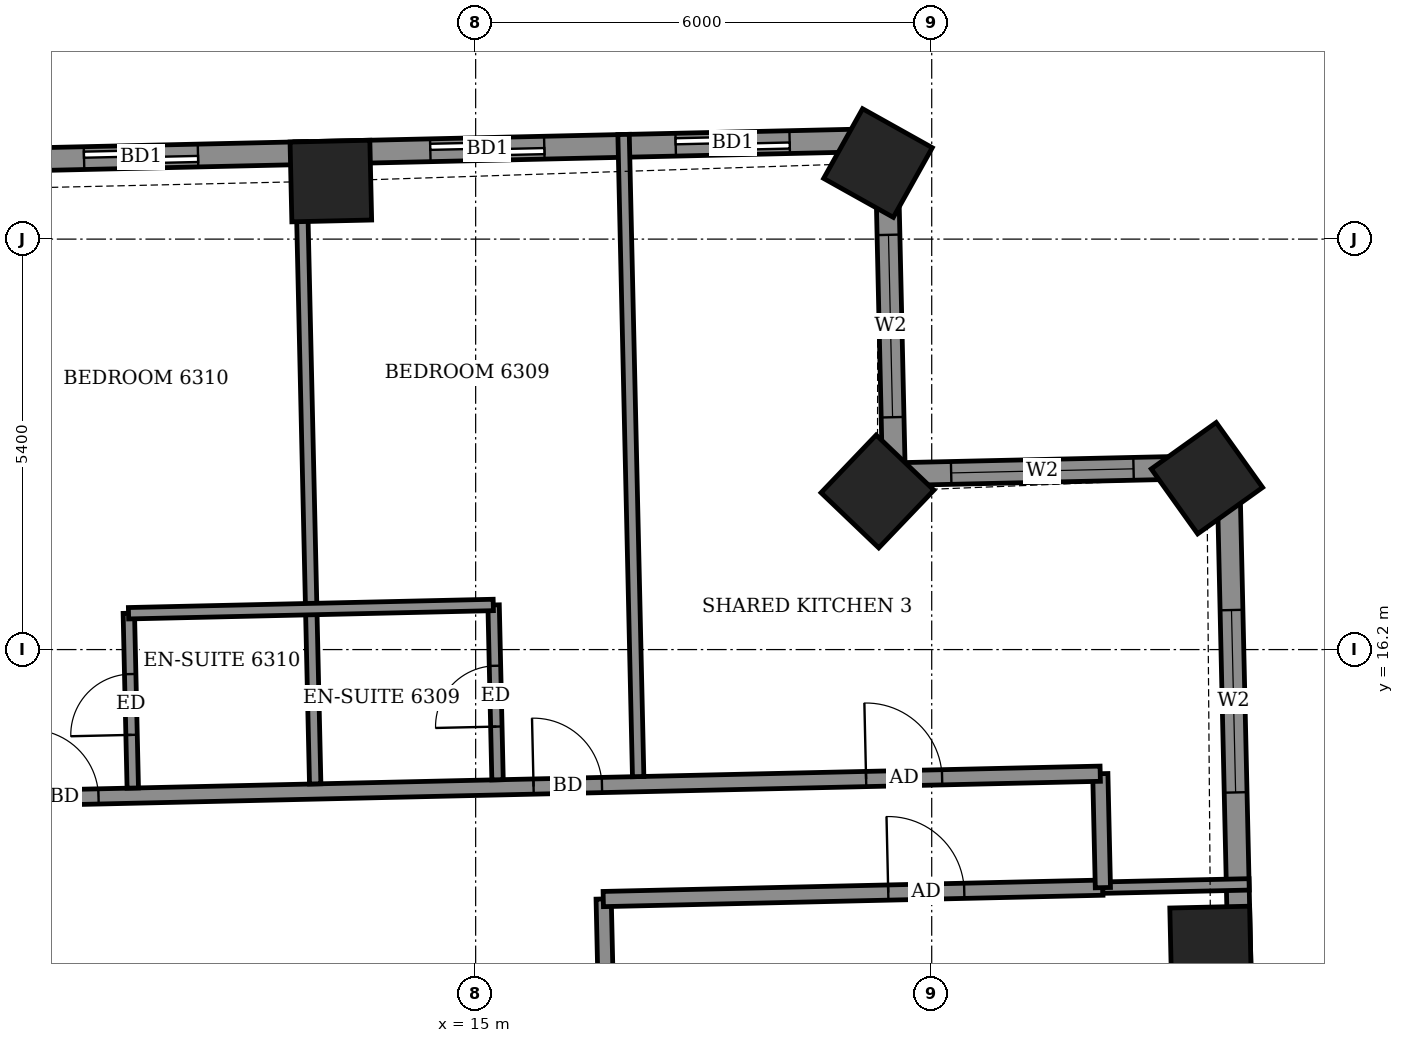
"""IFC4 building model, lengths in metres.
Left out: names, types, materials, properties, quantities, classifications, styles, units other than length and angle.
Written with IfcOpenShell. Run it as: python <this file> out.ifc"""

import sys

from ifc_helpers import new_model, si_unit, direction, frame, frame_2d, origin, origin_2d, place, context, subcontext, project, spatial, rectangle, extrude, element, fill, save


model = new_model("IFC4")
c1 = context("Model", 3, precision=1e-05, world=origin(), true_north=direction((0.0, 1.0)))
c2 = subcontext(c1, "Body", "Model", "MODEL_VIEW")
j1 = project(units=[si_unit("LENGTHUNIT", "METRE"), si_unit("PLANEANGLEUNIT", "RADIAN")], contexts=[c1])
p1 = place(None, origin())
s1 = spatial("IfcSite", under=j1, at=p1, CompositionType="ELEMENT")
p2 = place(p1, origin())
s2 = spatial("IfcBuilding", under=s1, at=p2, CompositionType="ELEMENT")
p3 = place(p2, frame((0.0, 0.0, 249.1)))
s3 = spatial("IfcBuildingStorey", under=s2, at=p3, CompositionType="ELEMENT", Elevation=249.1)
for number, where, z_axis, x_axis in (
    (1, (24.669, 12.287, -0.55), (0.0, 0.0, 1.0), (-0.023, 1.0, 0.0)),
    (2, (24.621, 18.455, -0.55), (0.0, 0.0, 1.0), (-0.581, 0.814, 0.0)),
    (3, (20.286, 18.281, -0.55), (0.0, 0.0, 1.0), (-0.723, 0.691, 0.0)),
    (4, (20.293, 22.601, -0.55), (0.0, 0.0, 1.0), (-0.873, 0.488, 0.0)),
    (5, (13.095, 22.364, -0.55), (0.0, 0.0, 1.0), (-1.0, -0.023, 0.0)),
):
    element("IfcColumn", number, at=place(p3, frame(where, z_axis=z_axis, x_axis=x_axis)), inside=s3, PredefinedType="COLUMN", context=c2, shape_type="SweptSolid", body=[
        extrude(rectangle(XDim=1.05, YDim=1.05, at=origin_2d()), origin(), (0.0, 0.0, 1.0), 3.6),
    ])
p4 = place(p3, frame((25.203, 5.31, 0.0), z_axis=(0.0, 0.0, 1.0), x_axis=(-0.022708061432, 0.999742138727, 0.0)))
e6 = element("IfcWall", 6, at=p4, inside=s3, PredefinedType="SOLIDWALL", context=c2, shape_type="SweptSolid", body=[
    extrude(rectangle(XDim=13.299, YDim=0.3, at=frame_2d((6.65, 0.0))), origin(), (0.0, 0.0, 1.0), 2.55),
])
p5 = place(p4, frame((3.986, 0.0, 0.0)))
e7 = element("IfcOpeningElement", 7, at=p5, cuts=e6, PredefinedType="OPENING", context=c2, shape_type="SweptSolid", body=[
    extrude(rectangle(XDim=1.5, YDim=2.4, at=frame_2d((0.75, 1.2))), frame((0.0, 0.16, 0.0), z_axis=(0.0, -1.0, 0.0), x_axis=(1.0, 0.0, 0.0)), (0.0, 0.0, 1.0), 0.32),
])
p6 = place(p4, frame((9.013, 0.0, 0.9)))
e8 = element("IfcOpeningElement", 8, at=p6, cuts=e6, PredefinedType="OPENING", context=c2, shape_type="SweptSolid", body=[
    extrude(rectangle(XDim=2.4, YDim=1.5, at=frame_2d((1.2, 0.75))), frame((0.0, 0.16, 0.0), z_axis=(0.0, -1.0, 0.0), x_axis=(1.0, 0.0, 0.0)), (0.0, 0.0, 1.0), 0.32),
])
p7 = place(p3, frame((24.901, 18.606, 0.0), z_axis=(0.0, 0.0, 1.0), x_axis=(-0.999747476176, -0.022471846368, 0.0)))
e9 = element("IfcWall", 9, at=p7, inside=s3, PredefinedType="SOLIDWALL", context=c2, shape_type="SweptSolid", body=[
    extrude(rectangle(XDim=4.4, YDim=0.3, at=frame_2d((2.2, 0.0))), origin(), (0.0, 0.0, 1.0), 2.55),
])
p8 = place(p7, frame((1.246, 0.0, 0.9)))
e10 = element("IfcOpeningElement", 10, at=p8, cuts=e9, PredefinedType="OPENING", context=c2, shape_type="SweptSolid", body=[
    extrude(rectangle(XDim=2.4, YDim=1.5, at=frame_2d((1.2, 0.75))), frame((0.0, 0.16, 0.0), z_axis=(0.0, -1.0, 0.0), x_axis=(1.0, 0.0, 0.0)), (0.0, 0.0, 1.0), 0.32),
])
p9 = place(p3, frame((20.502, 18.507, 0.0), z_axis=(0.0, 0.0, 1.0), x_axis=(-0.02247683371, 0.999747364061, 0.0)))
e11 = element("IfcWall", 11, at=p9, inside=s3, PredefinedType="SOLIDWALL", context=c2, shape_type="SweptSolid", body=[
    extrude(rectangle(XDim=4.399, YDim=0.3, at=frame_2d((2.2, 0.0))), origin(), (0.0, 0.0, 1.0), 2.55),
])
p10 = place(p9, frame((0.75, 0.0, 0.9)))
e12 = element("IfcOpeningElement", 12, at=p10, cuts=e11, PredefinedType="OPENING", context=c2, shape_type="SweptSolid", body=[
    extrude(rectangle(XDim=2.4, YDim=1.5, at=frame_2d((1.2, 0.75))), frame((0.0, 0.16, 0.0), z_axis=(0.0, -1.0, 0.0), x_axis=(1.0, 0.0, 0.0)), (0.0, 0.0, 1.0), 0.32),
])
p11 = place(p3, frame((20.403, 22.905, 0.0), z_axis=(0.0, 0.0, 1.0), x_axis=(-0.99974298964, -0.022670568288, 0.0)))
e13 = element("IfcWall", 13, at=p11, inside=s3, PredefinedType="SOLIDWALL", context=c2, shape_type="SweptSolid", body=[
    extrude(rectangle(XDim=44.509, YDim=0.3, at=frame_2d((22.254, 0.0))), origin(), (0.0, 0.0, 1.0), 2.5),
])
p12 = place(p11, frame((1.272, 0.0, 0.0)))
e14 = element("IfcOpeningElement", 14, at=p12, cuts=e13, PredefinedType="OPENING", context=c2, shape_type="SweptSolid", body=[
    extrude(rectangle(XDim=1.5, YDim=2.4, at=frame_2d((0.75, 1.2))), frame((0.0, 0.16, 0.0), z_axis=(0.0, -1.0, 0.0), x_axis=(1.0, 0.0, 0.0)), (0.0, 0.0, 1.0), 0.32),
])
p13 = place(p11, frame((4.501, 0.0, 0.0)))
e15 = element("IfcOpeningElement", 15, at=p13, cuts=e13, PredefinedType="OPENING", context=c2, shape_type="SweptSolid", body=[
    extrude(rectangle(XDim=1.5, YDim=2.4, at=frame_2d((0.75, 1.2))), frame((0.0, 0.16, 0.0), z_axis=(0.0, -1.0, 0.0), x_axis=(1.0, 0.0, 0.0)), (0.0, 0.0, 1.0), 0.32),
])
p14 = place(p11, frame((9.058, 0.0, 0.0)))
e16 = element("IfcOpeningElement", 16, at=p14, cuts=e13, PredefinedType="OPENING", context=c2, shape_type="SweptSolid", body=[
    extrude(rectangle(XDim=1.5, YDim=2.4, at=frame_2d((0.75, 1.2))), frame((0.0, 0.16, 0.0), z_axis=(0.0, -1.0, 0.0), x_axis=(1.0, 0.0, 0.0)), (0.0, 0.0, 1.0), 0.32),
])
p15 = place(p11, frame((12.46, 0.0, 0.0)))
e17 = element("IfcOpeningElement", 17, at=p15, cuts=e13, PredefinedType="OPENING", context=c2, shape_type="SweptSolid", body=[
    extrude(rectangle(XDim=1.5, YDim=2.4, at=frame_2d((0.75, 1.2))), frame((0.0, 0.16, 0.0), z_axis=(0.0, -1.0, 0.0), x_axis=(1.0, 0.0, 0.0)), (0.0, 0.0, 1.0), 0.32),
])
p16 = place(p11, frame((17.533, 0.0, 0.0)))
e18 = element("IfcOpeningElement", 18, at=p16, cuts=e13, PredefinedType="OPENING", context=c2, shape_type="SweptSolid", body=[
    extrude(rectangle(XDim=1.5, YDim=2.4, at=frame_2d((0.75, 1.2))), frame((0.0, 0.16, 0.0), z_axis=(0.0, -1.0, 0.0), x_axis=(1.0, 0.0, 0.0)), (0.0, 0.0, 1.0), 0.32),
])
p17 = place(p11, frame((22.993, 0.0, 0.0)))
e19 = element("IfcOpeningElement", 19, at=p17, cuts=e13, PredefinedType="OPENING", context=c2, shape_type="SweptSolid", body=[
    extrude(rectangle(XDim=1.2, YDim=2.4, at=frame_2d((0.6, 1.2))), frame((0.0, 0.16, 0.0), z_axis=(0.0, -1.0, 0.0), x_axis=(1.0, 0.0, 0.0)), (0.0, 0.0, 1.0), 0.32),
])
p18 = place(p11, frame((26.033, 0.0, 0.0)))
e20 = element("IfcOpeningElement", 20, at=p18, cuts=e13, PredefinedType="OPENING", context=c2, shape_type="SweptSolid", body=[
    extrude(rectangle(XDim=1.5, YDim=2.4, at=frame_2d((0.75, 1.2))), frame((0.0, 0.16, 0.0), z_axis=(0.0, -1.0, 0.0), x_axis=(1.0, 0.0, 0.0)), (0.0, 0.0, 1.0), 0.32),
])
p19 = place(p11, frame((30.827, 0.0, 0.0)))
e21 = element("IfcOpeningElement", 21, at=p19, cuts=e13, PredefinedType="OPENING", context=c2, shape_type="SweptSolid", body=[
    extrude(rectangle(XDim=1.5, YDim=2.4, at=frame_2d((0.75, 1.2))), frame((0.0, 0.16, 0.0), z_axis=(0.0, -1.0, 0.0), x_axis=(1.0, 0.0, 0.0)), (0.0, 0.0, 1.0), 0.32),
])
p20 = place(p11, frame((34.286, 0.0, 0.0)))
e22 = element("IfcOpeningElement", 22, at=p20, cuts=e13, PredefinedType="OPENING", context=c2, shape_type="SweptSolid", body=[
    extrude(rectangle(XDim=1.5, YDim=2.4, at=frame_2d((0.75, 1.2))), frame((0.0, 0.16, 0.0), z_axis=(0.0, -1.0, 0.0), x_axis=(1.0, 0.0, 0.0)), (0.0, 0.0, 1.0), 0.32),
])
p21 = place(p11, frame((38.811, 0.0, 0.0)))
e23 = element("IfcOpeningElement", 23, at=p21, cuts=e13, PredefinedType="OPENING", context=c2, shape_type="SweptSolid", body=[
    extrude(rectangle(XDim=1.5, YDim=2.4, at=frame_2d((0.75, 1.2))), frame((0.0, 0.16, 0.0), z_axis=(0.0, -1.0, 0.0), x_axis=(1.0, 0.0, 0.0)), (0.0, 0.0, 1.0), 0.32),
])
p22 = place(p11, frame((42.148, 0.0, 0.9)))
e24 = element("IfcOpeningElement", 24, at=p22, cuts=e13, PredefinedType="OPENING", context=c2, shape_type="SweptSolid", body=[
    extrude(rectangle(XDim=1.2, YDim=1.5, at=frame_2d((0.6, 0.75))), frame((0.0, 0.16, 0.0), z_axis=(0.0, -1.0, 0.0), x_axis=(1.0, 0.0, 0.0)), (0.0, 0.0, 1.0), 0.32),
])
p23 = place(p3, frame((16.803, 7.675, 0.0), z_axis=(0.0, 0.0, 1.0), x_axis=(-0.022667483124, 0.999743059595, 0.0)))
e25 = element("IfcWall", 25, at=p23, inside=s3, PredefinedType="PARTITIONING", context=c2, shape_type="SweptSolid", body=[
    extrude(rectangle(XDim=5.245, YDim=0.2, at=frame_2d((2.623, 0.0))), origin(), (0.0, 0.0, 1.0), 3.05),
])
p24 = place(p3, frame((16.679, 12.918, 0.0), z_axis=(0.0, 0.0, 1.0), x_axis=(0.999739125025, 0.022840356696, 0.0)))
e26 = element("IfcWall", 26, at=p24, inside=s3, PredefinedType="PARTITIONING", context=c2, shape_type="SweptSolid", body=[
    extrude(rectangle(XDim=6.574, YDim=0.2, at=frame_2d((3.287, 0.0))), origin(), (0.0, 0.0, 1.0), 3.05),
])
p25 = place(p24, frame((3.75, 0.0, 0.0)))
e27 = element("IfcOpeningElement", 27, at=p25, cuts=e26, PredefinedType="OPENING", context=c2, shape_type="SweptSolid", body=[
    extrude(rectangle(XDim=1.0, YDim=2.1, at=frame_2d((0.5, 1.05))), frame((0.0, 0.11, 0.0), z_axis=(0.0, -1.0, 0.0), x_axis=(1.0, 0.0, 0.0)), (0.0, 0.0, 1.0), 0.22),
])
p26 = place(p3, frame((23.251, 13.068, 0.0), z_axis=(0.0, 0.0, 1.0), x_axis=(0.999750982596, 0.022315304114, 0.0)))
e28 = element("IfcWall", 28, at=p26, inside=s3, PredefinedType="PARTITIONING", context=c2, shape_type="SweptSolid", body=[
    extrude(rectangle(XDim=1.926, YDim=0.15, at=frame_2d((0.963, 0.0))), origin(), (0.0, 0.0, 1.0), 2.55),
])
p27 = place(p3, frame((23.252, 13.068, 0.0), z_axis=(0.0, 0.0, 1.0), x_axis=(-0.022636322434, 0.999743765625, 0.0)))
e29 = element("IfcWall", 29, at=p27, inside=s3, PredefinedType="PARTITIONING", context=c2, shape_type="SweptSolid", body=[
    extrude(rectangle(XDim=1.499, YDim=0.2, at=frame_2d((0.75, 0.0))), origin(), (0.0, 0.0, 1.0), 3.05),
])
p28 = place(p3, frame((-27.652, 13.413, 0.0), z_axis=(0.0, 0.0, 1.0), x_axis=(0.999742864992, 0.022676064408, 0.0)))
e30 = element("IfcWall", 30, at=p28, inside=s3, PredefinedType="PARTITIONING", context=c2, shape_type="SweptSolid", body=[
    extrude(rectangle(XDim=50.882, YDim=0.2, at=frame_2d((25.441, 0.0))), origin(), (0.0, 0.0, 1.0), 3.05),
])
p29 = place(p28, frame((47.801, 0.0, 0.0)))
e31 = element("IfcOpeningElement", 31, at=p29, cuts=e30, PredefinedType="OPENING", context=c2, shape_type="SweptSolid", body=[
    extrude(rectangle(XDim=1.0, YDim=2.1, at=frame_2d((0.5, 1.05))), frame((0.0, 0.11, 0.0), z_axis=(0.0, -1.0, 0.0), x_axis=(1.0, 0.0, 0.0)), (0.0, 0.0, 1.0), 0.22),
])
p30 = place(p28, frame((43.425, 0.0, 0.0)))
e32 = element("IfcOpeningElement", 32, at=p30, cuts=e30, PredefinedType="OPENING", context=c2, shape_type="SweptSolid", body=[
    extrude(rectangle(XDim=0.9, YDim=2.1, at=frame_2d((0.45, 1.05))), frame((0.0, 0.11, 0.0), z_axis=(0.0, -1.0, 0.0), x_axis=(1.0, 0.0, 0.0)), (0.0, 0.0, 1.0), 0.22),
])
p31 = place(p28, frame((36.8, 0.0, 0.0)))
e33 = element("IfcOpeningElement", 33, at=p31, cuts=e30, PredefinedType="OPENING", context=c2, shape_type="SweptSolid", body=[
    extrude(rectangle(XDim=0.9, YDim=2.1, at=frame_2d((0.45, 1.05))), frame((0.0, 0.11, 0.0), z_axis=(0.0, -1.0, 0.0), x_axis=(1.0, 0.0, 0.0)), (0.0, 0.0, 1.0), 0.22),
])
p32 = place(p28, frame((34.975, 0.0, 0.0)))
e34 = element("IfcOpeningElement", 34, at=p32, cuts=e30, PredefinedType="OPENING", context=c2, shape_type="SweptSolid", body=[
    extrude(rectangle(XDim=0.9, YDim=2.1, at=frame_2d((0.45, 1.05))), frame((0.0, 0.11, 0.0), z_axis=(0.0, -1.0, 0.0), x_axis=(1.0, 0.0, 0.0)), (0.0, 0.0, 1.0), 0.22),
])
p33 = place(p28, frame((28.325, 0.0, 0.0)))
e35 = element("IfcOpeningElement", 35, at=p33, cuts=e30, PredefinedType="OPENING", context=c2, shape_type="SweptSolid", body=[
    extrude(rectangle(XDim=0.9, YDim=2.1, at=frame_2d((0.45, 1.05))), frame((0.0, 0.11, 0.0), z_axis=(0.0, -1.0, 0.0), x_axis=(1.0, 0.0, 0.0)), (0.0, 0.0, 1.0), 0.22),
])
p34 = place(p28, frame((26.475, 0.0, 0.0)))
e36 = element("IfcOpeningElement", 36, at=p34, cuts=e30, PredefinedType="OPENING", context=c2, shape_type="SweptSolid", body=[
    extrude(rectangle(XDim=0.9, YDim=2.1, at=frame_2d((0.45, 1.05))), frame((0.0, 0.11, 0.0), z_axis=(0.0, -1.0, 0.0), x_axis=(1.0, 0.0, 0.0)), (0.0, 0.0, 1.0), 0.22),
])
p35 = place(p28, frame((19.825, 0.0, 0.0)))
e37 = element("IfcOpeningElement", 37, at=p35, cuts=e30, PredefinedType="OPENING", context=c2, shape_type="SweptSolid", body=[
    extrude(rectangle(XDim=0.9, YDim=2.1, at=frame_2d((0.45, 1.05))), frame((0.0, 0.11, 0.0), z_axis=(0.0, -1.0, 0.0), x_axis=(1.0, 0.0, 0.0)), (0.0, 0.0, 1.0), 0.22),
])
p36 = place(p28, frame((17.975, 0.0, 0.0)))
e38 = element("IfcOpeningElement", 38, at=p36, cuts=e30, PredefinedType="OPENING", context=c2, shape_type="SweptSolid", body=[
    extrude(rectangle(XDim=0.9, YDim=2.1, at=frame_2d((0.45, 1.05))), frame((0.0, 0.11, 0.0), z_axis=(0.0, -1.0, 0.0), x_axis=(1.0, 0.0, 0.0)), (0.0, 0.0, 1.0), 0.22),
])
p37 = place(p28, frame((11.325, 0.0, 0.0)))
e39 = element("IfcOpeningElement", 39, at=p37, cuts=e30, PredefinedType="OPENING", context=c2, shape_type="SweptSolid", body=[
    extrude(rectangle(XDim=0.9, YDim=2.1, at=frame_2d((0.45, 1.05))), frame((0.0, 0.11, 0.0), z_axis=(0.0, -1.0, 0.0), x_axis=(1.0, 0.0, 0.0)), (0.0, 0.0, 1.0), 0.22),
])
p38 = place(p28, frame((9.475, 0.0, 0.0)))
e40 = element("IfcOpeningElement", 40, at=p38, cuts=e30, PredefinedType="OPENING", context=c2, shape_type="SweptSolid", body=[
    extrude(rectangle(XDim=0.9, YDim=2.1, at=frame_2d((0.45, 1.05))), frame((0.0, 0.11, 0.0), z_axis=(0.0, -1.0, 0.0), x_axis=(1.0, 0.0, 0.0)), (0.0, 0.0, 1.0), 0.22),
])
p39 = place(p28, frame((2.772, 0.0, 0.0)))
e41 = element("IfcOpeningElement", 41, at=p39, cuts=e30, PredefinedType="OPENING", context=c2, shape_type="SweptSolid", body=[
    extrude(rectangle(XDim=1.0, YDim=2.1, at=frame_2d((0.5, 1.05))), frame((0.0, 0.11, 0.0), z_axis=(0.0, -1.0, 0.0), x_axis=(1.0, 0.0, 0.0)), (0.0, 0.0, 1.0), 0.22),
])
p40 = place(p3, frame((10.489, 14.378, 0.0), z_axis=(0.0, 0.0, 1.0), x_axis=(-0.022603288534, 0.999744513037, 0.0)))
e42 = element("IfcWall", 42, at=p40, inside=s3, PredefinedType="PARTITIONING", context=c2, shape_type="SweptSolid", body=[
    extrude(rectangle(XDim=2.301, YDim=0.15, at=frame_2d((1.15, 0.0))), origin(), (0.0, 0.0, 1.0), 3.05),
])
p41 = place(p40, frame((0.7, 0.0, 0.0)))
e43 = element("IfcOpeningElement", 43, at=p41, cuts=e42, PredefinedType="OPENING", context=c2, shape_type="SweptSolid", body=[
    extrude(rectangle(XDim=0.8, YDim=2.1, at=frame_2d((0.4, 1.05))), frame((0.0, 0.085, 0.0), z_axis=(0.0, -1.0, 0.0), x_axis=(1.0, 0.0, 0.0)), (0.0, 0.0, 1.0), 0.17),
])
p42 = place(p3, frame((12.889, 14.433, 0.0), z_axis=(0.0, 0.0, 1.0), x_axis=(-0.022708935798, 0.999742118866, 0.0)))
e44 = element("IfcWall", 44, at=p42, inside=s3, PredefinedType="PARTITIONING", context=c2, shape_type="SweptSolid", body=[
    extrude(rectangle(XDim=8.45, YDim=0.15, at=frame_2d((4.225, 0.0))), origin(), (0.0, 0.0, 1.0), 3.05),
])
p43 = place(p3, frame((15.288, 14.487, 0.0), z_axis=(0.0, 0.0, 1.0), x_axis=(-0.022603288534, 0.999744513037, 0.0)))
e45 = element("IfcWall", 45, at=p43, inside=s3, PredefinedType="PARTITIONING", context=c2, shape_type="SweptSolid", body=[
    extrude(rectangle(XDim=2.301, YDim=0.15, at=frame_2d((1.15, 0.0))), origin(), (0.0, 0.0, 1.0), 3.05),
])
p44 = place(p43, frame((0.7, 0.0, 0.0)))
e46 = element("IfcOpeningElement", 46, at=p44, cuts=e45, PredefinedType="OPENING", context=c2, shape_type="SweptSolid", body=[
    extrude(rectangle(XDim=0.8, YDim=2.1, at=frame_2d((0.4, 1.05))), frame((0.0, 0.085, 0.0), z_axis=(0.0, -1.0, 0.0), x_axis=(1.0, 0.0, 0.0)), (0.0, 0.0, 1.0), 0.17),
])
p45 = place(p3, frame((17.138, 14.529, 0.0), z_axis=(0.0, 0.0, 1.0), x_axis=(-0.022708935798, 0.999742118866, 0.0)))
e47 = element("IfcWall", 47, at=p45, inside=s3, PredefinedType="PARTITIONING", context=c2, shape_type="SweptSolid", body=[
    extrude(rectangle(XDim=8.45, YDim=0.15, at=frame_2d((4.225, 0.0))), origin(), (0.0, 0.0, 1.0), 2.5),
])
p46 = place(p3, frame((10.433, 16.678, 0.0), z_axis=(0.0, 0.0, 1.0), x_axis=(0.999741520352, 0.022735269617, 0.0)))
e48 = element("IfcWall", 48, at=p46, inside=s3, PredefinedType="PARTITIONING", context=c2, shape_type="SweptSolid", body=[
    extrude(rectangle(XDim=4.8, YDim=0.15, at=frame_2d((2.4, 0.0))), origin(), (0.0, 0.0, 1.0), 3.05),
])
p47 = place(p6, origin())
e49 = element("IfcWindow", 49, at=p47, inside=s3, PartitioningType="DOUBLE_PANEL_VERTICAL", PredefinedType="WINDOW", context=c2, shape_type="SweptSolid", body=[
    extrude(rectangle(XDim=2.4, YDim=1.5, at=frame_2d((1.2, 0.75))), frame((0.0, 0.03, 0.0), z_axis=(0.0, -1.0, 0.0), x_axis=(1.0, 0.0, 0.0)), (0.0, 0.0, 1.0), 0.06),
])
fill(e8, e49)
p48 = place(p8, origin())
e50 = element("IfcWindow", 50, at=p48, inside=s3, PartitioningType="DOUBLE_PANEL_VERTICAL", PredefinedType="WINDOW", context=c2, shape_type="SweptSolid", body=[
    extrude(rectangle(XDim=2.4, YDim=1.5, at=frame_2d((1.2, 0.75))), frame((0.0, 0.03, 0.0), z_axis=(0.0, -1.0, 0.0), x_axis=(1.0, 0.0, 0.0)), (0.0, 0.0, 1.0), 0.06),
])
fill(e10, e50)
p49 = place(p10, origin())
e51 = element("IfcWindow", 51, at=p49, inside=s3, PartitioningType="DOUBLE_PANEL_VERTICAL", PredefinedType="WINDOW", context=c2, shape_type="SweptSolid", body=[
    extrude(rectangle(XDim=2.4, YDim=1.5, at=frame_2d((1.2, 0.75))), frame((0.0, 0.03, 0.0), z_axis=(0.0, -1.0, 0.0), x_axis=(1.0, 0.0, 0.0)), (0.0, 0.0, 1.0), 0.06),
])
fill(e12, e51)
p50 = place(p12, origin())
e52 = element("IfcDoor", 52, at=p50, inside=s3, OperationType="SLIDING_TO_LEFT", PredefinedType="DOOR", context=c2, shape_type="SweptSolid", body=[
    extrude(rectangle(XDim=1.5, YDim=2.4, at=frame_2d((0.75, 1.2))), frame((0.0, 0.025, 0.0), z_axis=(0.0, -1.0, 0.0), x_axis=(1.0, 0.0, 0.0)), (0.0, 0.0, 1.0), 0.05),
])
fill(e14, e52)
p51 = place(p13, origin())
e53 = element("IfcDoor", 53, at=p51, inside=s3, OperationType="SLIDING_TO_LEFT", PredefinedType="DOOR", context=c2, shape_type="SweptSolid", body=[
    extrude(rectangle(XDim=1.5, YDim=2.4, at=frame_2d((0.75, 1.2))), frame((0.0, 0.025, 0.0), z_axis=(0.0, -1.0, 0.0), x_axis=(1.0, 0.0, 0.0)), (0.0, 0.0, 1.0), 0.05),
])
fill(e15, e53)
p52 = place(p14, origin())
e54 = element("IfcDoor", 54, at=p52, inside=s3, OperationType="SLIDING_TO_LEFT", PredefinedType="DOOR", context=c2, shape_type="SweptSolid", body=[
    extrude(rectangle(XDim=1.5, YDim=2.4, at=frame_2d((0.75, 1.2))), frame((0.0, 0.025, 0.0), z_axis=(0.0, -1.0, 0.0), x_axis=(1.0, 0.0, 0.0)), (0.0, 0.0, 1.0), 0.05),
])
fill(e16, e54)
p53 = place(p25, origin())
e55 = element("IfcDoor", 55, at=p53, inside=s3, OperationType="SINGLE_SWING_RIGHT", PredefinedType="DOOR", context=c2, shape_type="SweptSolid", body=[
    extrude(rectangle(XDim=1.0, YDim=2.1, at=frame_2d((0.5, 1.05))), frame((0.0, 0.025, 0.0), z_axis=(0.0, -1.0, 0.0), x_axis=(1.0, 0.0, 0.0)), (0.0, 0.0, 1.0), 0.05),
])
fill(e27, e55)
p54 = place(p29, origin())
e56 = element("IfcDoor", 56, at=p54, inside=s3, OperationType="SINGLE_SWING_LEFT", PredefinedType="DOOR", context=c2, shape_type="SweptSolid", body=[
    extrude(rectangle(XDim=1.0, YDim=2.1, at=frame_2d((0.5, 1.05))), frame((0.0, 0.025, 0.0), z_axis=(0.0, -1.0, 0.0), x_axis=(1.0, 0.0, 0.0)), (0.0, 0.0, 1.0), 0.05),
])
fill(e31, e56)
p55 = place(p30, origin())
e57 = element("IfcDoor", 57, at=p55, inside=s3, OperationType="SINGLE_SWING_LEFT", PredefinedType="DOOR", context=c2, shape_type="SweptSolid", body=[
    extrude(rectangle(XDim=0.9, YDim=2.1, at=frame_2d((0.45, 1.05))), frame((0.0, 0.025, 0.0), z_axis=(0.0, -1.0, 0.0), x_axis=(1.0, 0.0, 0.0)), (0.0, 0.0, 1.0), 0.05),
])
fill(e32, e57)
p56 = place(p44, origin())
e58 = element("IfcDoor", 58, at=p56, inside=s3, OperationType="SINGLE_SWING_LEFT", PredefinedType="DOOR", context=c2, shape_type="SweptSolid", body=[
    extrude(rectangle(XDim=0.8, YDim=2.1, at=frame_2d((0.4, 1.05))), frame((0.0, 0.025, 0.0), z_axis=(0.0, -1.0, 0.0), x_axis=(1.0, 0.0, 0.0)), (0.0, 0.0, 1.0), 0.05),
])
fill(e46, e58)
p57 = place(p31, origin())
e59 = element("IfcDoor", 59, at=p57, inside=s3, OperationType="SINGLE_SWING_RIGHT", PredefinedType="DOOR", context=c2, shape_type="SweptSolid", body=[
    extrude(rectangle(XDim=0.9, YDim=2.1, at=frame_2d((0.45, 1.05))), frame((0.0, 0.025, 0.0), z_axis=(0.0, -1.0, 0.0), x_axis=(1.0, 0.0, 0.0)), (0.0, 0.0, 1.0), 0.05),
])
fill(e33, e59)
p58 = place(p41, origin())
e60 = element("IfcDoor", 60, at=p58, inside=s3, OperationType="SINGLE_SWING_RIGHT", PredefinedType="DOOR", context=c2, shape_type="SweptSolid", body=[
    extrude(rectangle(XDim=0.8, YDim=2.1, at=frame_2d((0.4, 1.05))), frame((0.0, 0.025, 0.0), z_axis=(0.0, -1.0, 0.0), x_axis=(1.0, 0.0, 0.0)), (0.0, 0.0, 1.0), 0.05),
])
fill(e43, e60)
save(model, sys.argv[1])
